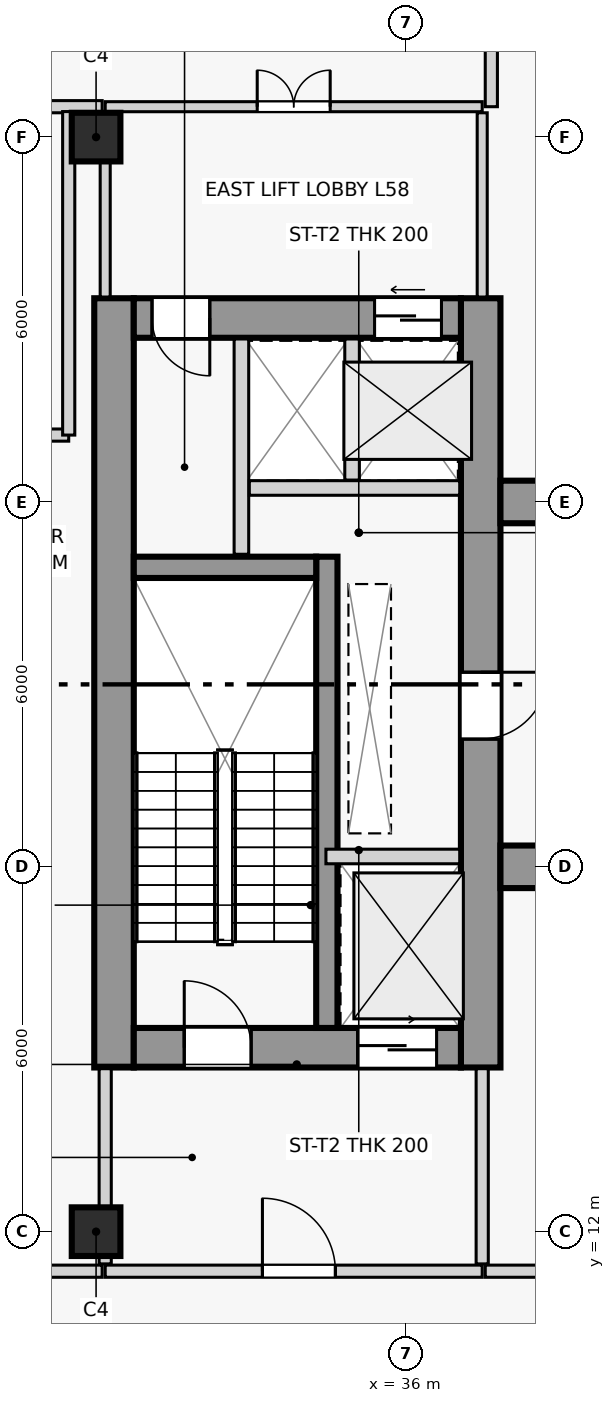
"""IFC4 building model, lengths in metres.
Left out: names, types, materials, properties, quantities, classifications, styles, units other than length and angle.
Written with IfcOpenShell. Run it as: python <this file> out.ifc"""

import sys

from ifc_helpers import new_model, si_unit, direction, frame, frame_2d, origin, origin_2d, place, context, subcontext, project, spatial, rectangle, extrude, source, transform, mapped, element, fill, save


model = new_model("IFC4")
c1 = context("Model", 3, precision=1e-05, world=origin(), true_north=direction((0.0, 1.0)))
c2 = subcontext(c1, "Body", "Model", "MODEL_VIEW")
j1 = project(units=[si_unit("LENGTHUNIT", "METRE"), si_unit("PLANEANGLEUNIT", "RADIAN")], contexts=[c1])
p1 = place(None, origin())
s1 = spatial("IfcSite", under=j1, at=p1, CompositionType="ELEMENT")
p2 = place(p1, origin())
s2 = spatial("IfcBuilding", under=s1, at=p2, CompositionType="ELEMENT")
p3 = place(p2, frame((0.0, 0.0, 220.5)))
s3 = spatial("IfcBuildingStorey", under=s2, at=p3, CompositionType="ELEMENT", Elevation=220.5)
p4 = place(p3, frame((31.195, 14.7, 0.0), z_axis=(0.0, 0.0, 1.0), x_axis=(0.0, 1.0, 0.0)))
e1 = element("IfcWall", 1, at=p4, inside=s3, PredefinedType="SHEAR", context=c2, shape_type="SweptSolid", body=[
    extrude(rectangle(XDim=12.65, YDim=0.65, at=frame_2d((6.325, 0.0))), origin(), (0.0, 0.0, 1.0), 7.2),
])
p5 = place(p3, frame((37.225, 14.7, 0.0), z_axis=(0.0, 0.0, 1.0), x_axis=(0.0, 1.0, 0.0)))
e2 = element("IfcWall", 2, at=p5, inside=s3, PredefinedType="SHEAR", context=c2, shape_type="SweptSolid", body=[
    extrude(rectangle(XDim=12.65, YDim=0.65, at=frame_2d((6.325, 0.0))), origin(), (0.0, 0.0, 1.0), 7.2),
])
p6 = place(p5, frame((5.4, 0.0, 0.0)))
e3 = element("IfcOpeningElement", 3, at=p6, cuts=e2, PredefinedType="OPENING", context=c2, shape_type="SweptSolid", body=[
    extrude(rectangle(XDim=1.1, YDim=2.2, at=frame_2d((0.55, 1.1))), frame((0.0, 0.335, 0.0), z_axis=(0.0, -1.0, 0.0), x_axis=(1.0, 0.0, 0.0)), (0.0, 0.0, 1.0), 0.67),
])
p7 = place(p3, frame((31.52, 15.025, 0.0), z_axis=(0.0, 0.0, 1.0), x_axis=(1.0, 0.0, 0.0)))
e4 = element("IfcWall", 4, at=p7, inside=s3, PredefinedType="SHEAR", context=c2, shape_type="SweptSolid", body=[
    extrude(rectangle(XDim=5.38, YDim=0.65, at=frame_2d((2.69, 0.0))), origin(), (0.0, 0.0, 1.0), 7.2),
])
p8 = place(p7, frame((0.83, 0.0, 0.0)))
e5 = element("IfcOpeningElement", 5, at=p8, cuts=e4, PredefinedType="OPENING", context=c2, shape_type="SweptSolid", body=[
    extrude(rectangle(XDim=1.1, YDim=2.2, at=frame_2d((0.55, 1.1))), frame((0.0, 0.335, 0.0), z_axis=(0.0, -1.0, 0.0), x_axis=(1.0, 0.0, 0.0)), (0.0, 0.0, 1.0), 0.67),
])
p9 = place(p7, frame((3.68, 0.0, 0.0)))
e6 = element("IfcOpeningElement", 6, at=p9, cuts=e4, PredefinedType="OPENING", context=c2, shape_type="SweptSolid", body=[
    extrude(rectangle(XDim=1.3, YDim=2.2, at=frame_2d((0.65, 1.1))), frame((0.0, 0.335, 0.0), z_axis=(0.0, -1.0, 0.0), x_axis=(1.0, 0.0, 0.0)), (0.0, 0.0, 1.0), 0.67),
])
p10 = place(p3, frame((31.52, 27.025, 0.0), z_axis=(0.0, 0.0, 1.0), x_axis=(1.0, 0.0, 0.0)))
e7 = element("IfcWall", 7, at=p10, inside=s3, PredefinedType="SHEAR", context=c2, shape_type="SweptSolid", body=[
    extrude(rectangle(XDim=5.38, YDim=0.65, at=frame_2d((2.69, 0.0))), origin(), (0.0, 0.0, 1.0), 7.2),
])
p11 = place(p10, frame((0.3, 0.0, 0.0)))
e8 = element("IfcOpeningElement", 8, at=p11, cuts=e7, PredefinedType="OPENING", context=c2, shape_type="SweptSolid", body=[
    extrude(rectangle(XDim=0.95, YDim=2.1, at=frame_2d((0.475, 1.05))), frame((0.0, 0.335, 0.0), z_axis=(0.0, -1.0, 0.0), x_axis=(1.0, 0.0, 0.0)), (0.0, 0.0, 1.0), 0.67),
])
p12 = place(p10, frame((3.96, 0.0, 0.0)))
e9 = element("IfcOpeningElement", 9, at=p12, cuts=e7, PredefinedType="OPENING", context=c2, shape_type="SweptSolid", body=[
    extrude(rectangle(XDim=1.1, YDim=2.2, at=frame_2d((0.55, 1.1))), frame((0.0, 0.335, 0.0), z_axis=(0.0, -1.0, 0.0), x_axis=(1.0, 0.0, 0.0)), (0.0, 0.0, 1.0), 0.67),
])
p13 = place(p3, frame((34.695, 15.35, 0.0), z_axis=(0.0, 0.0, 1.0), x_axis=(0.0, 1.0, 0.0)))
e10 = element("IfcWall", 10, at=p13, inside=s3, PredefinedType="SHEAR", context=c2, shape_type="SweptSolid", body=[
    extrude(rectangle(XDim=7.75, YDim=0.35, at=frame_2d((3.875, 0.0))), origin(), (0.0, 0.0, 1.0), 7.2),
])
p14 = place(p3, frame((31.52, 22.925, 0.0), z_axis=(0.0, 0.0, 1.0), x_axis=(1.0, 0.0, 0.0)))
e11 = element("IfcWall", 11, at=p14, inside=s3, PredefinedType="SHEAR", context=c2, shape_type="SweptSolid", body=[
    extrude(rectangle(XDim=3.0, YDim=0.35, at=frame_2d((1.5, 0.0))), origin(), (0.0, 0.0, 1.0), 7.2),
])
m1 = source(origin(), c2, "Body", "SweptSolid", [
    extrude(rectangle(XDim=0.8, YDim=0.8, at=origin_2d()), origin(), (0.0, 0.0, 1.0), 7.2),
])
for number, where, z_axis, x_axis in (
    (12, (30.9, 12.0, 0.0), (0.0, 0.0, 1.0), (1.0, 0.0, 0.0)),
    (13, (30.9, 30.0, 0.0), (0.0, 0.0, 1.0), (1.0, 0.0, 0.0)),
):
    element("IfcColumn", number, at=place(p3, frame(where, z_axis=z_axis, x_axis=x_axis)), inside=s3, PredefinedType="COLUMN", context=c2, shape_type="MappedRepresentation", body=[
        mapped(m1, transform((0.0, 0.0, 0.0), scale=1.0)),
    ])
for number, where, z_axis, x_axis in (
    (14, (37.55, 18.0, 0.0), (0.0, 0.0, 1.0), (1.0, 0.0, 0.0)),
    (15, (37.55, 24.0, 0.0), (0.0, 0.0, 1.0), (1.0, 0.0, 0.0)),
):
    element("IfcWall", number, at=place(p3, frame(where, z_axis=z_axis, x_axis=x_axis)), inside=s3, PredefinedType="SOLIDWALL", context=c2, shape_type="SweptSolid", body=[
        extrude(rectangle(XDim=6.8, YDim=0.7, at=frame_2d((3.4, 0.0))), origin(), (0.0, 0.0, 1.0), 6.55),
    ])
p15 = place(p3, frame((34.68, 18.17, 0.0), z_axis=(0.0, 0.0, 1.0), x_axis=(1.0, 0.0, 0.0)))
e16 = element("IfcWall", 16, at=p15, inside=s3, PredefinedType="PARTITIONING", context=c2, shape_type="SweptSolid", body=[
    extrude(rectangle(XDim=2.2, YDim=0.24, at=frame_2d((1.1, 0.0))), origin(), (0.0, 0.0, 1.0), 6.55),
])
p16 = place(p3, frame((31.05, 11.35, 0.0), z_axis=(0.0, 0.0, 1.0), x_axis=(1.0, 0.0, 0.0)))
e17 = element("IfcWall", 17, at=p16, inside=s3, PredefinedType="PARTITIONING", context=c2, shape_type="SweptSolid", body=[
    extrude(rectangle(XDim=6.2, YDim=0.2, at=frame_2d((3.1, 0.0))), origin(), (0.0, 0.0, 1.0), 4.95),
])
p17 = place(p16, frame((2.586, 0.0, 0.0)))
e18 = element("IfcOpeningElement", 18, at=p17, cuts=e17, PredefinedType="OPENING", context=c2, shape_type="SweptSolid", body=[
    extrude(rectangle(XDim=1.2, YDim=2.2, at=frame_2d((0.6, 1.1))), frame((0.0, 0.11, 0.0), z_axis=(0.0, -1.0, 0.0), x_axis=(1.0, 0.0, 0.0)), (0.0, 0.0, 1.0), 0.22),
])
p18 = place(p3, frame((31.05, 11.47, 0.0), z_axis=(0.0, 0.0, 1.0), x_axis=(0.0, 1.0, 0.0)))
e19 = element("IfcWall", 19, at=p18, inside=s3, PredefinedType="PARTITIONING", context=c2, shape_type="SweptSolid", body=[
    extrude(rectangle(XDim=3.21, YDim=0.2, at=frame_2d((1.605, 0.0))), origin(), (0.0, 0.0, 1.0), 4.95),
])
p19 = place(p3, frame((37.25, 11.47, 0.0), z_axis=(0.0, 0.0, 1.0), x_axis=(0.0, 1.0, 0.0)))
e20 = element("IfcWall", 20, at=p19, inside=s3, PredefinedType="PARTITIONING", context=c2, shape_type="SweptSolid", body=[
    extrude(rectangle(XDim=3.21, YDim=0.2, at=frame_2d((1.605, 0.0))), origin(), (0.0, 0.0, 1.0), 6.55),
])
p20 = place(p3, frame((33.29, 23.14, 0.0), z_axis=(0.0, 0.0, 1.0), x_axis=(0.0, 1.0, 0.0)))
e21 = element("IfcWall", 21, at=p20, inside=s3, PredefinedType="PARTITIONING", context=c2, shape_type="SweptSolid", body=[
    extrude(rectangle(XDim=3.54, YDim=0.24, at=frame_2d((1.77, 0.0))), origin(), (0.0, 0.0, 1.0), 6.55),
])
p21 = place(p3, frame((33.42, 24.23, 0.0), z_axis=(0.0, 0.0, 1.0), x_axis=(1.0, 0.0, 0.0)))
e22 = element("IfcWall", 22, at=p21, inside=s3, PredefinedType="PARTITIONING", context=c2, shape_type="SweptSolid", body=[
    extrude(rectangle(XDim=3.46, YDim=0.24, at=frame_2d((1.73, 0.0))), origin(), (0.0, 0.0, 1.0), 6.55),
])
p22 = place(p3, frame((35.11, 24.36, 0.0), z_axis=(0.0, 0.0, 1.0), x_axis=(0.0, 1.0, 0.0)))
e23 = element("IfcWall", 23, at=p22, inside=s3, PredefinedType="PARTITIONING", context=c2, shape_type="SweptSolid", body=[
    extrude(rectangle(XDim=2.32, YDim=0.24, at=frame_2d((1.16, 0.0))), origin(), (0.0, 0.0, 1.0), 6.55),
])
p23 = place(p3, frame((31.05, 30.5, 0.0), z_axis=(0.0, 0.0, 1.0), x_axis=(1.0, 0.0, 0.0)))
e24 = element("IfcWall", 24, at=p23, inside=s3, PredefinedType="PARTITIONING", context=c2, shape_type="SweptSolid", body=[
    extrude(rectangle(XDim=6.2, YDim=0.165, at=frame_2d((3.1, 0.0))), origin(), (0.0, 0.0, 1.0), 4.95),
])
p24 = place(p23, frame((2.5, 0.0, 0.0)))
e25 = element("IfcOpeningElement", 25, at=p24, cuts=e24, PredefinedType="OPENING", context=c2, shape_type="SweptSolid", body=[
    extrude(rectangle(XDim=1.2, YDim=2.2, at=frame_2d((0.6, 1.1))), frame((0.0, 0.093, 0.0), z_axis=(0.0, -1.0, 0.0), x_axis=(1.0, 0.0, 0.0)), (0.0, 0.0, 1.0), 0.185),
])
p25 = place(p3, frame((31.05, 27.37, 0.0), z_axis=(0.0, 0.0, 1.0), x_axis=(0.0, 1.0, 0.0)))
e26 = element("IfcWall", 26, at=p25, inside=s3, PredefinedType="PARTITIONING", context=c2, shape_type="SweptSolid", body=[
    extrude(rectangle(XDim=3.03, YDim=0.165, at=frame_2d((1.515, 0.0))), origin(), (0.0, 0.0, 1.0), 4.95),
])
p26 = place(p3, frame((37.25, 27.37, 0.0), z_axis=(0.0, 0.0, 1.0), x_axis=(0.0, 1.0, 0.0)))
e27 = element("IfcWall", 27, at=p26, inside=s3, PredefinedType="PARTITIONING", context=c2, shape_type="SweptSolid", body=[
    extrude(rectangle(XDim=3.03, YDim=0.165, at=frame_2d((1.515, 0.0))), origin(), (0.0, 0.0, 1.0), 6.55),
])
p27 = place(p3, frame((15.2, 11.35, 0.0), z_axis=(0.0, 0.0, 1.0), x_axis=(1.0, 0.0, 0.0)))
e28 = element("IfcWall", 28, at=p27, inside=s3, PredefinedType="PARTITIONING", context=c2, shape_type="SweptSolid", body=[
    extrude(rectangle(XDim=15.8, YDim=0.2, at=frame_2d((7.9, 0.0))), origin(), (0.0, 0.0, 1.0), 4.95),
])
p28 = place(p3, frame((37.3, 11.35, 0.0), z_axis=(0.0, 0.0, 1.0), x_axis=(1.0, 0.0, 0.0)))
e29 = element("IfcWall", 29, at=p28, inside=s3, PredefinedType="PARTITIONING", context=c2, shape_type="SweptSolid", body=[
    extrude(rectangle(XDim=5.5, YDim=0.2, at=frame_2d((2.75, 0.0))), origin(), (0.0, 0.0, 1.0), 4.95),
])
p29 = place(p3, frame((15.2, 30.5, 0.0), z_axis=(0.0, 0.0, 1.0), x_axis=(1.0, 0.0, 0.0)))
e30 = element("IfcWall", 30, at=p29, inside=s3, PredefinedType="PARTITIONING", context=c2, shape_type="SweptSolid", body=[
    extrude(rectangle(XDim=15.8, YDim=0.2, at=frame_2d((7.9, 0.0))), origin(), (0.0, 0.0, 1.0), 4.95),
])
p30 = place(p29, frame((2.95, 0.0, 0.0)))
e31 = element("IfcOpeningElement", 31, at=p30, cuts=e30, PredefinedType="OPENING", context=c2, shape_type="SweptSolid", body=[
    extrude(rectangle(XDim=1.1, YDim=2.2, at=frame_2d((0.55, 1.1))), frame((0.0, 0.11, 0.0), z_axis=(0.0, -1.0, 0.0), x_axis=(1.0, 0.0, 0.0)), (0.0, 0.0, 1.0), 0.22),
])
p31 = place(p29, frame((5.0, 0.0, 0.0)))
e32 = element("IfcOpeningElement", 32, at=p31, cuts=e30, PredefinedType="OPENING", context=c2, shape_type="SweptSolid", body=[
    extrude(rectangle(XDim=1.1, YDim=2.2, at=frame_2d((0.55, 1.1))), frame((0.0, 0.11, 0.0), z_axis=(0.0, -1.0, 0.0), x_axis=(1.0, 0.0, 0.0)), (0.0, 0.0, 1.0), 0.22),
])
p32 = place(p29, frame((7.2, 0.0, 0.0)))
e33 = element("IfcOpeningElement", 33, at=p32, cuts=e30, PredefinedType="OPENING", context=c2, shape_type="SweptSolid", body=[
    extrude(rectangle(XDim=1.1, YDim=2.2, at=frame_2d((0.55, 1.1))), frame((0.0, 0.11, 0.0), z_axis=(0.0, -1.0, 0.0), x_axis=(1.0, 0.0, 0.0)), (0.0, 0.0, 1.0), 0.22),
])
p33 = place(p29, frame((9.4, 0.0, 0.0)))
e34 = element("IfcOpeningElement", 34, at=p33, cuts=e30, PredefinedType="OPENING", context=c2, shape_type="SweptSolid", body=[
    extrude(rectangle(XDim=1.1, YDim=2.2, at=frame_2d((0.55, 1.1))), frame((0.0, 0.11, 0.0), z_axis=(0.0, -1.0, 0.0), x_axis=(1.0, 0.0, 0.0)), (0.0, 0.0, 1.0), 0.22),
])
p34 = place(p29, frame((11.55, 0.0, 0.0)))
e35 = element("IfcOpeningElement", 35, at=p34, cuts=e30, PredefinedType="OPENING", context=c2, shape_type="SweptSolid", body=[
    extrude(rectangle(XDim=1.1, YDim=2.2, at=frame_2d((0.55, 1.1))), frame((0.0, 0.11, 0.0), z_axis=(0.0, -1.0, 0.0), x_axis=(1.0, 0.0, 0.0)), (0.0, 0.0, 1.0), 0.22),
])
p35 = place(p29, frame((13.45, 0.0, 0.0)))
e36 = element("IfcOpeningElement", 36, at=p35, cuts=e30, PredefinedType="OPENING", context=c2, shape_type="SweptSolid", body=[
    extrude(rectangle(XDim=1.1, YDim=2.2, at=frame_2d((0.55, 1.1))), frame((0.0, 0.11, 0.0), z_axis=(0.0, -1.0, 0.0), x_axis=(1.0, 0.0, 0.0)), (0.0, 0.0, 1.0), 0.22),
])
p36 = place(p3, frame((37.4, 30.5, 0.0), z_axis=(0.0, 0.0, 1.0), x_axis=(0.0, 1.0, 0.0)))
e37 = element("IfcWall", 37, at=p36, inside=s3, PredefinedType="PARTITIONING", context=c2, shape_type="SweptSolid", body=[
    extrude(rectangle(XDim=2.0, YDim=0.2, at=frame_2d((1.0, 0.0))), origin(), (0.0, 0.0, 1.0), 6.55),
])
p37 = place(p3, frame((15.75, 25.1, 0.0), z_axis=(0.0, 0.0, 1.0), x_axis=(1.0, 0.0, 0.0)))
e38 = element("IfcWall", 38, at=p37, inside=s3, PredefinedType="PARTITIONING", context=c2, shape_type="SweptSolid", body=[
    extrude(rectangle(XDim=14.7, YDim=0.2, at=frame_2d((7.35, 0.0))), origin(), (0.0, 0.0, 1.0), 6.55),
])
p38 = place(p3, frame((30.45, 25.1, 0.0), z_axis=(0.0, 0.0, 1.0), x_axis=(0.0, 1.0, 0.0)))
e39 = element("IfcWall", 39, at=p38, inside=s3, PredefinedType="PARTITIONING", context=c2, shape_type="SweptSolid", body=[
    extrude(rectangle(XDim=5.32, YDim=0.2, at=frame_2d((2.66, 0.0))), origin(), (0.0, 0.0, 1.0), 4.95),
])
m2 = source(origin(), c2, "Body", "SweptSolid", [
    extrude(rectangle(XDim=1.1, YDim=2.2, at=frame_2d((0.55, 1.1))), frame((0.0, 0.025, 0.0), z_axis=(0.0, -1.0, 0.0), x_axis=(1.0, 0.0, 0.0)), (0.0, 0.0, 1.0), 0.05),
])
p39 = place(p8, origin())
e40 = element("IfcDoor", 40, at=p39, inside=s3, OperationType="SINGLE_SWING_LEFT", PredefinedType="DOOR", context=c2, shape_type="MappedRepresentation", body=[
    mapped(m2, transform((0.0, 0.0, 0.0), scale=1.0)),
])
fill(e5, e40)
m3 = source(origin(), c2, "Body", "SweptSolid", [
    extrude(rectangle(XDim=1.3, YDim=2.2, at=frame_2d((0.65, 1.1))), frame((0.0, 0.025, 0.0), z_axis=(0.0, -1.0, 0.0), x_axis=(1.0, 0.0, 0.0)), (0.0, 0.0, 1.0), 0.05),
])
p40 = place(p9, origin())
e41 = element("IfcDoor", 41, at=p40, inside=s3, OperationType="SLIDING_TO_RIGHT", PredefinedType="DOOR", context=c2, shape_type="MappedRepresentation", body=[
    mapped(m3, transform((0.0, 0.0, 0.0), scale=1.0)),
])
fill(e6, e41)
m4 = source(origin(), c2, "Body", "SweptSolid", [
    extrude(rectangle(XDim=1.2, YDim=2.2, at=frame_2d((0.6, 1.1))), frame((0.0, 0.025, 0.0), z_axis=(0.0, -1.0, 0.0), x_axis=(1.0, 0.0, 0.0)), (0.0, 0.0, 1.0), 0.05),
])
p41 = place(p17, origin())
e42 = element("IfcDoor", 42, at=p41, inside=s3, OperationType="SINGLE_SWING_LEFT", PredefinedType="DOOR", context=c2, shape_type="MappedRepresentation", body=[
    mapped(m4, transform((0.0, 0.0, 0.0), scale=1.0)),
])
fill(e18, e42)
m5 = source(origin(), c2, "Body", "SweptSolid", [
    extrude(rectangle(XDim=0.95, YDim=2.1, at=frame_2d((0.475, 1.05))), frame((0.0, 0.025, 0.0), z_axis=(0.0, -1.0, 0.0), x_axis=(1.0, 0.0, 0.0)), (0.0, 0.0, 1.0), 0.05),
])
p42 = place(p11, frame((0.95, 0.0, 0.0), z_axis=(0.0, 0.0, 1.0), x_axis=(-1.0, 0.0, 0.0)))
e43 = element("IfcDoor", 43, at=p42, inside=s3, OperationType="SINGLE_SWING_LEFT", PredefinedType="DOOR", context=c2, shape_type="MappedRepresentation", body=[
    mapped(m5, transform((0.0, 0.0, 0.0), scale=1.0)),
])
fill(e8, e43)
m6 = source(origin(), c2, "Body", "SweptSolid", [
    extrude(rectangle(XDim=1.1, YDim=2.2, at=frame_2d((0.55, 1.1))), frame((0.0, 0.025, 0.0), z_axis=(0.0, -1.0, 0.0), x_axis=(1.0, 0.0, 0.0)), (0.0, 0.0, 1.0), 0.05),
])
p43 = place(p12, origin())
e44 = element("IfcDoor", 44, at=p43, inside=s3, OperationType="SLIDING_TO_LEFT", PredefinedType="DOOR", context=c2, shape_type="MappedRepresentation", body=[
    mapped(m6, transform((0.0, 0.0, 0.0), scale=1.0)),
])
fill(e9, e44)
p44 = place(p24, origin())
e45 = element("IfcDoor", 45, at=p44, inside=s3, OperationType="DOUBLE_DOOR_SINGLE_SWING", PredefinedType="DOOR", context=c2, shape_type="MappedRepresentation", body=[
    mapped(m4, transform((0.0, 0.0, 0.0), scale=1.0)),
])
fill(e25, e45)
p45 = place(p6, frame((1.1, 0.0, 0.0), z_axis=(0.0, 0.0, 1.0), x_axis=(-1.0, 0.0, 0.0)))
e46 = element("IfcDoor", 46, at=p45, inside=s3, OperationType="SINGLE_SWING_LEFT", PredefinedType="DOOR", context=c2, shape_type="MappedRepresentation", body=[
    mapped(m2, transform((0.0, 0.0, 0.0), scale=1.0)),
])
fill(e3, e46)
save(model, sys.argv[1])
